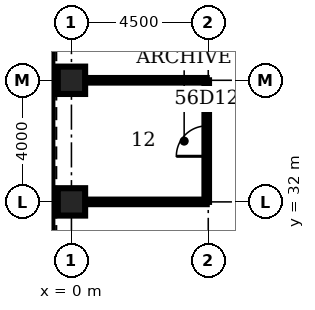
"""IFC4 building model, lengths in metres.
Left out: names, types, materials, properties, quantities, classifications, styles, units other than length and angle.
Written with IfcOpenShell. Run it as: python <this file> out.ifc"""

import sys

from ifc_helpers import new_model, si_unit, direction, frame, frame_2d, origin, origin_2d, place, context, subcontext, project, spatial, rectangle, hollow_rectangle, extrude, element, fill, save


model = new_model("IFC4")
c1 = context("Model", 3, precision=1e-05, world=origin(), true_north=direction((0.0, 1.0)))
c2 = subcontext(c1, "Body", "Model", "MODEL_VIEW")
j1 = project(units=[si_unit("LENGTHUNIT", "METRE"), si_unit("PLANEANGLEUNIT", "RADIAN")], contexts=[c1])
p1 = place(None, origin())
s1 = spatial("IfcSite", under=j1, at=p1, CompositionType="ELEMENT")
p2 = place(p1, origin())
s2 = spatial("IfcBuilding", under=s1, at=p2, CompositionType="ELEMENT")
p3 = place(p2, frame((0.0, 0.0, 248.8)))
s3 = spatial("IfcBuildingStorey", under=s2, at=p3, CompositionType="ELEMENT", Elevation=248.8)
for number, where, z_axis, x_axis in (
    (1, (0.0, 36.0, 0.0), (0.0, 0.0, 1.0), (1.0, 0.0, 0.0)),
    (2, (0.0, 32.0, 0.0), (0.0, 0.0, 1.0), (1.0, 0.0, 0.0)),
):
    element("IfcColumn", number, at=place(p3, frame(where, z_axis=z_axis, x_axis=x_axis)), inside=s3, PredefinedType="COLUMN", context=c2, shape_type="SweptSolid", body=[
        extrude(hollow_rectangle(XDim=0.9, YDim=0.9, WallThickness=0.07, at=origin_2d()), origin(), (0.0, 0.0, 1.0), 4.2),
    ])
for number, where, z_axis, x_axis in (
    (3, (0.45, 32.0, 0.0), (0.0, 0.0, 1.0), (1.0, 0.0, 0.0)),
    (4, (0.45, 36.0, 0.0), (0.0, 0.0, 1.0), (1.0, 0.0, 0.0)),
):
    element("IfcWall", number, at=place(p3, frame(where, z_axis=z_axis, x_axis=x_axis)), inside=s3, PredefinedType="PARTITIONING", context=c2, shape_type="SweptSolid", body=[
        extrude(rectangle(XDim=4.0, YDim=0.15, at=frame_2d((2.0, 0.0))), origin(), (0.0, 0.0, 1.0), 3.0),
    ])
p4 = place(p3, frame((4.45, 32.0, 0.0), z_axis=(0.0, 0.0, 1.0), x_axis=(0.0, 1.0, 0.0)))
e5 = element("IfcWall", 5, at=p4, inside=s3, PredefinedType="PARTITIONING", context=c2, shape_type="SweptSolid", body=[
    extrude(rectangle(XDim=4.0, YDim=0.15, at=frame_2d((2.0, 0.0))), origin(), (0.0, 0.0, 1.0), 3.0),
])
p5 = place(p4, frame((1.5, 0.0, 0.0)))
e6 = element("IfcOpeningElement", 6, at=p5, cuts=e5, PredefinedType="OPENING", context=c2, shape_type="SweptSolid", body=[
    extrude(rectangle(XDim=1.0, YDim=2.1, at=frame_2d((0.5, 1.05))), frame((0.0, 0.085, 0.0), z_axis=(0.0, -1.0, 0.0), x_axis=(1.0, 0.0, 0.0)), (0.0, 0.0, 1.0), 0.17),
])
p6 = place(p5, origin())
e7 = element("IfcDoor", 7, at=p6, inside=s3, OperationType="SINGLE_SWING_LEFT", PredefinedType="DOOR", context=c2, shape_type="SweptSolid", body=[
    extrude(rectangle(XDim=1.0, YDim=2.1, at=frame_2d((0.5, 1.05))), frame((0.0, 0.025, 0.0), z_axis=(0.0, -1.0, 0.0), x_axis=(1.0, 0.0, 0.0)), (0.0, 0.0, 1.0), 0.05),
])
fill(e6, e7)
save(model, sys.argv[1])
